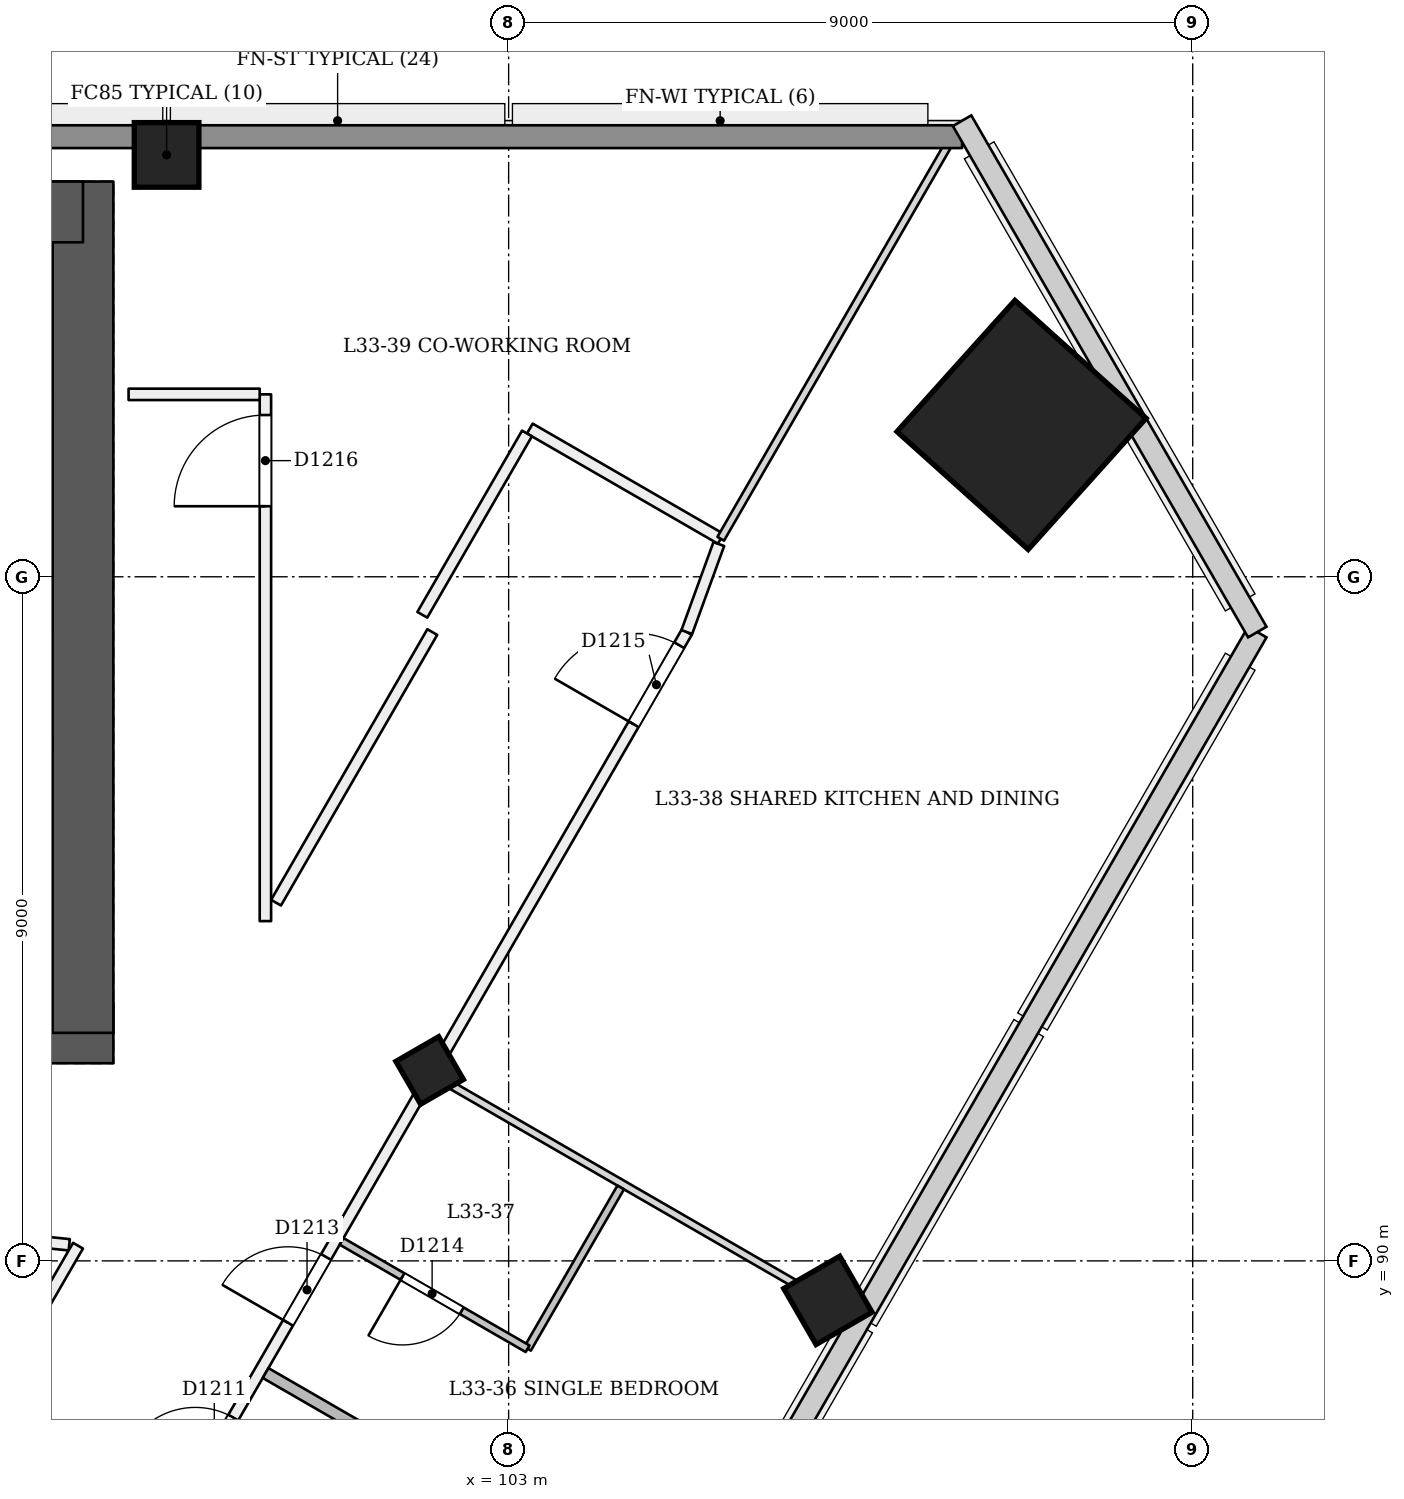
"""IFC4 building model, lengths in metres.
Left out: names, types, materials, properties, quantities, classifications, styles, units other than length and angle.
Written with IfcOpenShell. Run it as: python <this file> out.ifc"""

import sys

from ifc_helpers import new_model, si_unit, direction, frame, frame_2d, origin, origin_2d, place, context, subcontext, project, spatial, rectangle, extrude, element, fill, save


model = new_model("IFC4")
c1 = context("Model", 3, precision=1e-05, world=origin(), true_north=direction((0.0, 1.0)))
c2 = subcontext(c1, "Body", "Model", "MODEL_VIEW")
j1 = project(units=[si_unit("LENGTHUNIT", "METRE"), si_unit("PLANEANGLEUNIT", "RADIAN")], contexts=[c1])
p1 = place(None, origin())
s1 = spatial("IfcSite", under=j1, at=p1, CompositionType="ELEMENT")
p2 = place(p1, origin())
s2 = spatial("IfcBuilding", under=s1, at=p2, CompositionType="ELEMENT")
p3 = place(p2, frame((0.0, 0.0, 131.4)))
s3 = spatial("IfcBuildingStorey", under=s2, at=p3, CompositionType="ELEMENT", Elevation=131.4)
p4 = place(p3, frame((72.6, 93.0, 0.0), z_axis=(0.0, 0.0, 1.0), x_axis=(1.0, 0.0, 0.0)))
e1 = element("IfcWall", 1, at=p4, inside=s3, PredefinedType="SHEAR", context=c2, shape_type="SweptSolid", body=[
    extrude(rectangle(XDim=25.2, YDim=0.8, at=frame_2d((12.6, 0.0))), origin(), (0.0, 0.0, 1.0), 3.6),
])
p5 = place(p4, frame((1.2, 0.0, 0.0)))
e2 = element("IfcOpeningElement", 2, at=p5, cuts=e1, PredefinedType="OPENING", context=c2, shape_type="SweptSolid", body=[
    extrude(rectangle(XDim=1.2, YDim=2.1, at=frame_2d((0.6, 1.05))), frame((0.0, 0.411, 0.0), z_axis=(0.0, -1.0, 0.0), x_axis=(1.0, 0.0, 0.0)), (0.0, 0.0, 1.0), 0.821),
])
p6 = place(p4, frame((3.4, 0.0, 0.0)))
e3 = element("IfcOpeningElement", 3, at=p6, cuts=e1, PredefinedType="OPENING", context=c2, shape_type="SweptSolid", body=[
    extrude(rectangle(XDim=1.2, YDim=2.1, at=frame_2d((0.6, 1.05))), frame((0.0, 0.411, 0.0), z_axis=(0.0, -1.0, 0.0), x_axis=(1.0, 0.0, 0.0)), (0.0, 0.0, 1.0), 0.821),
])
p7 = place(p4, frame((13.4, 0.0, 0.0)))
e4 = element("IfcOpeningElement", 4, at=p7, cuts=e1, PredefinedType="OPENING", context=c2, shape_type="SweptSolid", body=[
    extrude(rectangle(XDim=1.2, YDim=2.1, at=frame_2d((0.6, 1.05))), frame((0.0, 0.411, 0.0), z_axis=(0.0, -1.0, 0.0), x_axis=(1.0, 0.0, 0.0)), (0.0, 0.0, 1.0), 0.821),
])
p8 = place(p4, frame((16.062, 0.0, 0.0)))
e5 = element("IfcOpeningElement", 5, at=p8, cuts=e1, PredefinedType="OPENING", context=c2, shape_type="SweptSolid", body=[
    extrude(rectangle(XDim=1.0, YDim=2.1, at=frame_2d((0.5, 1.05))), frame((0.0, 0.411, 0.0), z_axis=(0.0, -1.0, 0.0), x_axis=(1.0, 0.0, 0.0)), (0.0, 0.0, 1.0), 0.821),
])
p9 = place(p4, frame((18.85, 0.0, 0.0)))
e6 = element("IfcOpeningElement", 6, at=p9, cuts=e1, PredefinedType="OPENING", context=c2, shape_type="SweptSolid", body=[
    extrude(rectangle(XDim=1.0, YDim=2.1, at=frame_2d((0.5, 1.05))), frame((0.0, 0.411, 0.0), z_axis=(0.0, -1.0, 0.0), x_axis=(1.0, 0.0, 0.0)), (0.0, 0.0, 1.0), 0.821),
])
p10 = place(p4, frame((22.038, 0.0, 0.0)))
e7 = element("IfcOpeningElement", 7, at=p10, cuts=e1, PredefinedType="OPENING", context=c2, shape_type="SweptSolid", body=[
    extrude(rectangle(XDim=1.0, YDim=2.1, at=frame_2d((0.5, 1.05))), frame((0.0, 0.411, 0.0), z_axis=(0.0, -1.0, 0.0), x_axis=(1.0, 0.0, 0.0)), (0.0, 0.0, 1.0), 0.821),
])
p11 = place(p3, frame((97.4, 93.0, 0.0), z_axis=(0.0, 0.0, 1.0), x_axis=(0.0, 1.0, 0.0)))
e8 = element("IfcWall", 8, at=p11, inside=s3, PredefinedType="SHEAR", context=c2, shape_type="SweptSolid", body=[
    extrude(rectangle(XDim=11.2, YDim=0.8, at=frame_2d((5.6, 0.0))), origin(), (0.0, 0.0, 1.0), 3.6),
])
p12 = place(p3, frame((97.4, 103.8, 0.0), z_axis=(0.0, 0.0, 1.0), x_axis=(-1.0, 0.0, 0.0)))
e9 = element("IfcWall", 9, at=p12, inside=s3, PredefinedType="SHEAR", context=c2, shape_type="SweptSolid", body=[
    extrude(rectangle(XDim=25.2, YDim=0.8, at=frame_2d((12.6, 0.0))), origin(), (0.0, 0.0, 1.0), 3.6),
])
p13 = place(p3, frame((101.988, 92.458, -0.02), z_axis=(-0.02215519141, 0.038415882353, 0.999016199807), x_axis=(-0.500652777817, -0.865364161883, 0.022173483991)))
e10 = element("IfcColumn", 10, at=p13, inside=s3, PredefinedType="COLUMN", context=c2, shape_type="SweptSolid", body=[
    extrude(rectangle(XDim=0.65, YDim=0.65, at=origin_2d()), origin(), (0.0, 0.0, 1.0), 3.604),
])
p14 = place(p3, frame((109.782, 100.986, 0.0), z_axis=(-0.028401796786, 0.009286506348, 0.999553449666), x_axis=(0.498883843993, -0.866383845889, 0.022224801134)))
e11 = element("IfcColumn", 11, at=p14, inside=s3, PredefinedType="COLUMN", context=c2, shape_type="SweptSolid", body=[
    extrude(rectangle(XDim=2.32, YDim=2.32, at=origin_2d()), origin(), (0.0, 0.0, 1.0), 3.602),
])
p15 = place(p3, frame((98.5, 104.55, 0.0), z_axis=(0.0, 0.0, 1.0), x_axis=(1.0, 0.0, 0.0)))
e12 = element("IfcColumn", 12, at=p15, inside=s3, PredefinedType="COLUMN", context=c2, shape_type="SweptSolid", body=[
    extrude(rectangle(XDim=0.85, YDim=0.85, at=origin_2d()), origin(), (0.0, 0.0, 1.0), 3.6),
])
p16 = place(p3, frame((107.228, 89.433, -0.026), z_axis=(-0.022222852987, 0.038483477124, 0.999012095419), x_axis=(-0.500169957936, -0.865642131364, 0.022219666627)))
e13 = element("IfcColumn", 13, at=p16, inside=s3, PredefinedType="COLUMN", context=c2, shape_type="SweptSolid", body=[
    extrude(rectangle(XDim=0.85, YDim=0.85, at=origin_2d()), origin(), (0.0, 0.0, 1.0), 3.604),
])
p17 = place(p3, frame((93.431, 90.599, 0.0), z_axis=(0.0, 0.0, 1.0), x_axis=(0.994809932393, -0.101750667872, 0.0)))
e14 = element("IfcWall", 14, at=p17, inside=s3, PredefinedType="PARTITIONING", context=c2, shape_type="SweptSolid", body=[
    extrude(rectangle(XDim=3.808, YDim=0.15, at=frame_2d((1.904, 0.0))), origin(), (0.0, 0.0, 1.0), 3.15),
])
p18 = place(p3, frame((85.131, 63.263, 0.0), z_axis=(0.0, 0.0, 1.0), x_axis=(0.500002881847, 0.866023739943, 0.0)))
e15 = element("IfcWall", 15, at=p18, inside=s3, PredefinedType="PARTITIONING", context=c2, shape_type="SweptSolid", body=[
    extrude(rectangle(XDim=34.013, YDim=0.15, at=frame_2d((17.006, 0.0))), origin(), (0.0, 0.0, 1.0), 2.75),
])
p19 = place(p18, frame((0.351, 0.0, 0.0)))
e16 = element("IfcOpeningElement", 16, at=p19, cuts=e15, PredefinedType="OPENING", context=c2, shape_type="SweptSolid", body=[
    extrude(rectangle(XDim=1.2, YDim=2.1, at=frame_2d((0.6, 1.05))), frame((0.0, 0.085, 0.0), z_axis=(0.0, -1.0, 0.0), x_axis=(1.0, 0.0, 0.0)), (0.0, 0.0, 1.0), 0.171),
])
p20 = place(p18, frame((3.963, 0.0, 0.0)))
e17 = element("IfcOpeningElement", 17, at=p20, cuts=e15, PredefinedType="OPENING", context=c2, shape_type="SweptSolid", body=[
    extrude(rectangle(XDim=1.0, YDim=2.1, at=frame_2d((0.5, 1.05))), frame((0.0, 0.085, 0.0), z_axis=(0.0, -1.0, 0.0), x_axis=(1.0, 0.0, 0.0)), (0.0, 0.0, 1.0), 0.171),
])
p21 = place(p18, frame((9.493, 0.0, 0.0)))
e18 = element("IfcOpeningElement", 18, at=p21, cuts=e15, PredefinedType="OPENING", context=c2, shape_type="SweptSolid", body=[
    extrude(rectangle(XDim=1.0, YDim=2.1, at=frame_2d((0.5, 1.05))), frame((0.0, 0.085, 0.0), z_axis=(0.0, -1.0, 0.0), x_axis=(1.0, 0.0, 0.0)), (0.0, 0.0, 1.0), 0.171),
])
p22 = place(p18, frame((11.818, 0.0, 0.0)))
e19 = element("IfcOpeningElement", 19, at=p22, cuts=e15, PredefinedType="OPENING", context=c2, shape_type="SweptSolid", body=[
    extrude(rectangle(XDim=1.0, YDim=2.1, at=frame_2d((0.5, 1.05))), frame((0.0, 0.085, 0.0), z_axis=(0.0, -1.0, 0.0), x_axis=(1.0, 0.0, 0.0)), (0.0, 0.0, 1.0), 0.171),
])
p23 = place(p18, frame((18.608, 0.0, 0.0)))
e20 = element("IfcOpeningElement", 20, at=p23, cuts=e15, PredefinedType="OPENING", context=c2, shape_type="SweptSolid", body=[
    extrude(rectangle(XDim=1.0, YDim=2.1, at=frame_2d((0.5, 1.05))), frame((0.0, 0.085, 0.0), z_axis=(0.0, -1.0, 0.0), x_axis=(1.0, 0.0, 0.0)), (0.0, 0.0, 1.0), 0.171),
])
p24 = place(p18, frame((20.933, 0.0, 0.0)))
e21 = element("IfcOpeningElement", 21, at=p24, cuts=e15, PredefinedType="OPENING", context=c2, shape_type="SweptSolid", body=[
    extrude(rectangle(XDim=1.0, YDim=2.1, at=frame_2d((0.5, 1.05))), frame((0.0, 0.085, 0.0), z_axis=(0.0, -1.0, 0.0), x_axis=(1.0, 0.0, 0.0)), (0.0, 0.0, 1.0), 0.171),
])
p25 = place(p18, frame((27.493, 0.0, 0.0)))
e22 = element("IfcOpeningElement", 22, at=p25, cuts=e15, PredefinedType="OPENING", context=c2, shape_type="SweptSolid", body=[
    extrude(rectangle(XDim=1.0, YDim=2.1, at=frame_2d((0.5, 1.05))), frame((0.0, 0.085, 0.0), z_axis=(0.0, -1.0, 0.0), x_axis=(1.0, 0.0, 0.0)), (0.0, 0.0, 1.0), 0.171),
])
p26 = place(p18, frame((29.933, 0.0, 0.0)))
e23 = element("IfcOpeningElement", 23, at=p26, cuts=e15, PredefinedType="OPENING", context=c2, shape_type="SweptSolid", body=[
    extrude(rectangle(XDim=1.0, YDim=2.1, at=frame_2d((0.5, 1.05))), frame((0.0, 0.085, 0.0), z_axis=(0.0, -1.0, 0.0), x_axis=(1.0, 0.0, 0.0)), (0.0, 0.0, 1.0), 0.171),
])
p27 = place(p3, frame((102.138, 92.719, 0.0), z_axis=(0.0, 0.0, 1.0), x_axis=(0.500012451049, 0.866018215049, 0.0)))
e24 = element("IfcWall", 24, at=p27, inside=s3, PredefinedType="PARTITIONING", context=c2, shape_type="SweptSolid", body=[
    extrude(rectangle(XDim=6.413, YDim=0.15, at=frame_2d((3.207, 0.0))), origin(), (0.0, 0.0, 1.0), 3.15),
])
p28 = place(p27, frame((5.013, 0.0, 0.0)))
e25 = element("IfcOpeningElement", 25, at=p28, cuts=e24, PredefinedType="OPENING", context=c2, shape_type="SweptSolid", body=[
    extrude(rectangle(XDim=1.2, YDim=2.1, at=frame_2d((0.6, 1.05))), frame((0.0, 0.085, 0.0), z_axis=(0.0, -1.0, 0.0), x_axis=(1.0, 0.0, 0.0)), (0.0, 0.0, 1.0), 0.171),
])
p29 = place(p3, frame((105.344, 98.273, 0.0), z_axis=(0.0, 0.0, 1.0), x_axis=(0.341615779191, 0.939839698783, 0.0)))
e26 = element("IfcWall", 26, at=p29, inside=s3, PredefinedType="PARTITIONING", context=c2, shape_type="SweptSolid", body=[
    extrude(rectangle(XDim=1.232, YDim=0.15, at=frame_2d((0.616, 0.0))), origin(), (0.0, 0.0, 1.0), 3.15),
])
p30 = place(p3, frame((105.79, 99.5, 0.0), z_axis=(0.0, 0.0, 1.0), x_axis=(-0.866032775405, 0.499987231761, 0.0)))
e27 = element("IfcWall", 27, at=p30, inside=s3, PredefinedType="PARTITIONING", context=c2, shape_type="SweptSolid", body=[
    extrude(rectangle(XDim=2.9, YDim=0.15, at=frame_2d((1.45, 0.0))), origin(), (0.0, 0.0, 1.0), 3.15),
])
p31 = place(p3, frame((103.241, 100.885, 0.0), z_axis=(0.0, 0.0, 1.0), x_axis=(-0.499991038717, -0.866030577522, 0.0)))
e28 = element("IfcWall", 28, at=p31, inside=s3, PredefinedType="PARTITIONING", context=c2, shape_type="SweptSolid", body=[
    extrude(rectangle(XDim=2.754, YDim=0.15, at=frame_2d((1.377, 0.0))), origin(), (0.0, 0.0, 1.0), 3.15),
])
p32 = place(p3, frame((101.996, 98.273, 0.0), z_axis=(0.0, 0.0, 1.0), x_axis=(-0.500022314862, -0.866012519909, 0.0)))
e29 = element("IfcWall", 29, at=p32, inside=s3, PredefinedType="PARTITIONING", context=c2, shape_type="SweptSolid", body=[
    extrude(rectangle(XDim=4.111, YDim=0.15, at=frame_2d((2.056, 0.0))), origin(), (0.0, 0.0, 1.0), 3.15),
])
p33 = place(p3, frame((99.8, 94.47, 0.0), z_axis=(0.0, 0.0, 1.0), x_axis=(0.0, 1.0, 0.0)))
e30 = element("IfcWall", 30, at=p33, inside=s3, PredefinedType="PARTITIONING", context=c2, shape_type="SweptSolid", body=[
    extrude(rectangle(XDim=6.93, YDim=0.15, at=frame_2d((3.465, 0.0))), origin(), (0.0, 0.0, 1.0), 3.15),
])
p34 = place(p33, frame((5.458, 0.0, 0.0)))
e31 = element("IfcOpeningElement", 31, at=p34, cuts=e30, PredefinedType="OPENING", context=c2, shape_type="SweptSolid", body=[
    extrude(rectangle(XDim=1.2, YDim=2.1, at=frame_2d((0.6, 1.05))), frame((0.0, 0.085, 0.0), z_axis=(0.0, -1.0, 0.0), x_axis=(1.0, 0.0, 0.0)), (0.0, 0.0, 1.0), 0.171),
])
p35 = place(p3, frame((99.725, 101.4, 0.0), z_axis=(0.0, 0.0, 1.0), x_axis=(-1.0, 0.0, 0.0)))
e32 = element("IfcWall", 32, at=p35, inside=s3, PredefinedType="PARTITIONING", context=c2, shape_type="SweptSolid", body=[
    extrude(rectangle(XDim=1.725, YDim=0.15, at=frame_2d((0.863, 0.0))), origin(), (0.0, 0.0, 1.0), 3.15),
])
p36 = place(p3, frame((97.335, 90.2, 0.0), z_axis=(0.0, 0.0, 1.0), x_axis=(-0.500002918398, -0.86602371884, 0.0)))
e33 = element("IfcWall", 33, at=p36, inside=s3, PredefinedType="PARTITIONING", context=c2, shape_type="SweptSolid", body=[
    extrude(rectangle(XDim=24.539, YDim=0.15, at=frame_2d((12.27, 0.0))), origin(), (0.0, 0.0, 1.0), 3.15),
])
p37 = place(p36, frame((6.442, 0.0, 0.0)))
e34 = element("IfcOpeningElement", 34, at=p37, cuts=e33, PredefinedType="OPENING", context=c2, shape_type="SweptSolid", body=[
    extrude(rectangle(XDim=0.9, YDim=2.1, at=frame_2d((0.45, 1.05))), frame((0.0, 0.085, 0.0), z_axis=(0.0, -1.0, 0.0), x_axis=(1.0, 0.0, 0.0)), (0.0, 0.0, 1.0), 0.171),
])
p38 = place(p36, frame((2.46, 0.0, 0.0)))
e35 = element("IfcOpeningElement", 35, at=p38, cuts=e33, PredefinedType="OPENING", context=c2, shape_type="SweptSolid", body=[
    extrude(rectangle(XDim=0.9, YDim=2.1, at=frame_2d((0.45, 1.05))), frame((0.0, 0.085, 0.0), z_axis=(0.0, -1.0, 0.0), x_axis=(1.0, 0.0, 0.0)), (0.0, 0.0, 1.0), 0.171),
])
p39 = place(p36, frame((15.454, 0.0, 0.0)))
e36 = element("IfcOpeningElement", 36, at=p39, cuts=e33, PredefinedType="OPENING", context=c2, shape_type="SweptSolid", body=[
    extrude(rectangle(XDim=1.0, YDim=2.1, at=frame_2d((0.5, 1.05))), frame((0.0, 0.085, 0.0), z_axis=(0.0, -1.0, 0.0), x_axis=(1.0, 0.0, 0.0)), (0.0, 0.0, 1.0), 0.171),
])
p40 = place(p36, frame((10.281, 0.0, 0.0)))
e37 = element("IfcOpeningElement", 37, at=p40, cuts=e33, PredefinedType="OPENING", context=c2, shape_type="SweptSolid", body=[
    extrude(rectangle(XDim=1.0, YDim=2.1, at=frame_2d((0.5, 1.05))), frame((0.0, 0.085, 0.0), z_axis=(0.0, -1.0, 0.0), x_axis=(1.0, 0.0, 0.0)), (0.0, 0.0, 1.0), 0.171),
])
p41 = place(p3, frame((105.298, 85.352, 0.0), z_axis=(0.0, 0.0, 1.0), x_axis=(-0.866025401434, 0.500000004071, 0.0)))
e38 = element("IfcWall", 38, at=p41, inside=s3, PredefinedType="PARTITIONING", context=c2, shape_type="SweptSolid", body=[
    extrude(rectangle(XDim=6.345, YDim=0.15, at=frame_2d((3.173, 0.0))), origin(), (0.0, 0.0, 1.0), 2.65),
])
p42 = place(p3, frame((104.474, 90.966, 0.0), z_axis=(0.0, 0.0, 1.0), x_axis=(-0.500018594424, -0.866014668023, 0.0)))
e39 = element("IfcWall", 39, at=p42, inside=s3, PredefinedType="PARTITIONING", context=c2, shape_type="SweptSolid", body=[
    extrude(rectangle(XDim=2.45, YDim=0.1, at=frame_2d((1.225, 0.0))), origin(), (0.0, 0.0, 1.0), 2.75),
])
p43 = place(p3, frame((103.249, 88.844, 0.0), z_axis=(0.0, 0.0, 1.0), x_axis=(-0.866027263711, 0.4999967785, 0.0)))
e40 = element("IfcWall", 40, at=p43, inside=s3, PredefinedType="PARTITIONING", context=c2, shape_type="SweptSolid", body=[
    extrude(rectangle(XDim=2.825, YDim=0.1, at=frame_2d((1.412, 0.0))), origin(), (0.0, 0.0, 1.0), 3.15),
])
p44 = place(p43, frame((1.0, 0.0, 0.0)))
e41 = element("IfcOpeningElement", 41, at=p44, cuts=e40, PredefinedType="OPENING", context=c2, shape_type="SweptSolid", body=[
    extrude(rectangle(XDim=0.9, YDim=2.1, at=frame_2d((0.45, 1.05))), frame((0.0, 0.061, 0.0), z_axis=(0.0, -1.0, 0.0), x_axis=(1.0, 0.0, 0.0)), (0.0, 0.0, 1.0), 0.121),
])
p45 = place(p3, frame((107.53, 89.259, 0.0), z_axis=(0.0, 0.0, 1.0), x_axis=(-0.866025499775, 0.499999833739, 0.0)))
e42 = element("IfcWall", 42, at=p45, inside=s3, PredefinedType="PARTITIONING", context=c2, shape_type="SweptSolid", body=[
    extrude(rectangle(XDim=6.4, YDim=0.1, at=frame_2d((3.2, 0.0))), origin(), (0.0, 0.0, 1.0), 2.65),
])
p46 = place(p3, frame((108.908, 104.9, 0.0), z_axis=(0.0, 0.0, 1.0), x_axis=(-0.500004896655, -0.866022576681, 0.0)))
e43 = element("IfcWall", 43, at=p46, inside=s3, PredefinedType="PARTITIONING", context=c2, shape_type="SweptSolid", body=[
    extrude(rectangle(XDim=6.235, YDim=0.1, at=frame_2d((3.118, 0.0))), origin(), (0.0, 0.0, 1.0), 2.65),
])
p47 = place(p3, frame((61.034, 104.79, 0.0), z_axis=(0.0, 0.0, 1.0), x_axis=(1.0, 0.0, 0.0)))
e44 = element("IfcWall", 44, at=p47, inside=s3, PredefinedType="SOLIDWALL", context=c2, shape_type="SweptSolid", body=[
    extrude(rectangle(XDim=47.932, YDim=0.3, at=frame_2d((23.966, 0.0))), origin(), (0.0, 0.0, 1.0), 2.65),
])
p48 = place(p25, origin())
e45 = element("IfcDoor", 45, at=p48, inside=s3, OperationType="SINGLE_SWING_LEFT", PredefinedType="NOTDEFINED", context=c2, shape_type="SweptSolid", body=[
    extrude(rectangle(XDim=1.0, YDim=2.1, at=frame_2d((0.5, 1.05))), frame((0.0, 0.025, 0.0), z_axis=(0.0, -1.0, 0.0), x_axis=(1.0, 0.0, 0.0)), (0.0, 0.0, 1.0), 0.05),
])
fill(e22, e45)
p49 = place(p26, origin())
e46 = element("IfcDoor", 46, at=p49, inside=s3, OperationType="SINGLE_SWING_LEFT", PredefinedType="NOTDEFINED", context=c2, shape_type="SweptSolid", body=[
    extrude(rectangle(XDim=1.0, YDim=2.1, at=frame_2d((0.5, 1.05))), frame((0.0, 0.025, 0.0), z_axis=(0.0, -1.0, 0.0), x_axis=(1.0, 0.0, 0.0)), (0.0, 0.0, 1.0), 0.05),
])
fill(e23, e46)
p50 = place(p44, origin())
e47 = element("IfcDoor", 47, at=p50, inside=s3, OperationType="SINGLE_SWING_RIGHT", PredefinedType="NOTDEFINED", context=c2, shape_type="SweptSolid", body=[
    extrude(rectangle(XDim=0.9, YDim=2.1, at=frame_2d((0.45, 1.05))), frame((0.0, 0.025, 0.0), z_axis=(0.0, -1.0, 0.0), x_axis=(1.0, 0.0, 0.0)), (0.0, 0.0, 1.0), 0.05),
])
fill(e41, e47)
p51 = place(p28, origin())
e48 = element("IfcDoor", 48, at=p51, inside=s3, OperationType="SINGLE_SWING_LEFT", PredefinedType="NOTDEFINED", context=c2, shape_type="SweptSolid", body=[
    extrude(rectangle(XDim=1.2, YDim=2.1, at=frame_2d((0.6, 1.05))), frame((0.0, 0.025, 0.0), z_axis=(0.0, -1.0, 0.0), x_axis=(1.0, 0.0, 0.0)), (0.0, 0.0, 1.0), 0.05),
])
fill(e25, e48)
p52 = place(p34, origin())
e49 = element("IfcDoor", 49, at=p52, inside=s3, OperationType="SINGLE_SWING_LEFT", PredefinedType="NOTDEFINED", context=c2, shape_type="SweptSolid", body=[
    extrude(rectangle(XDim=1.2, YDim=2.1, at=frame_2d((0.6, 1.05))), frame((0.0, 0.025, 0.0), z_axis=(0.0, -1.0, 0.0), x_axis=(1.0, 0.0, 0.0)), (0.0, 0.0, 1.0), 0.05),
])
fill(e31, e49)
save(model, sys.argv[1])
